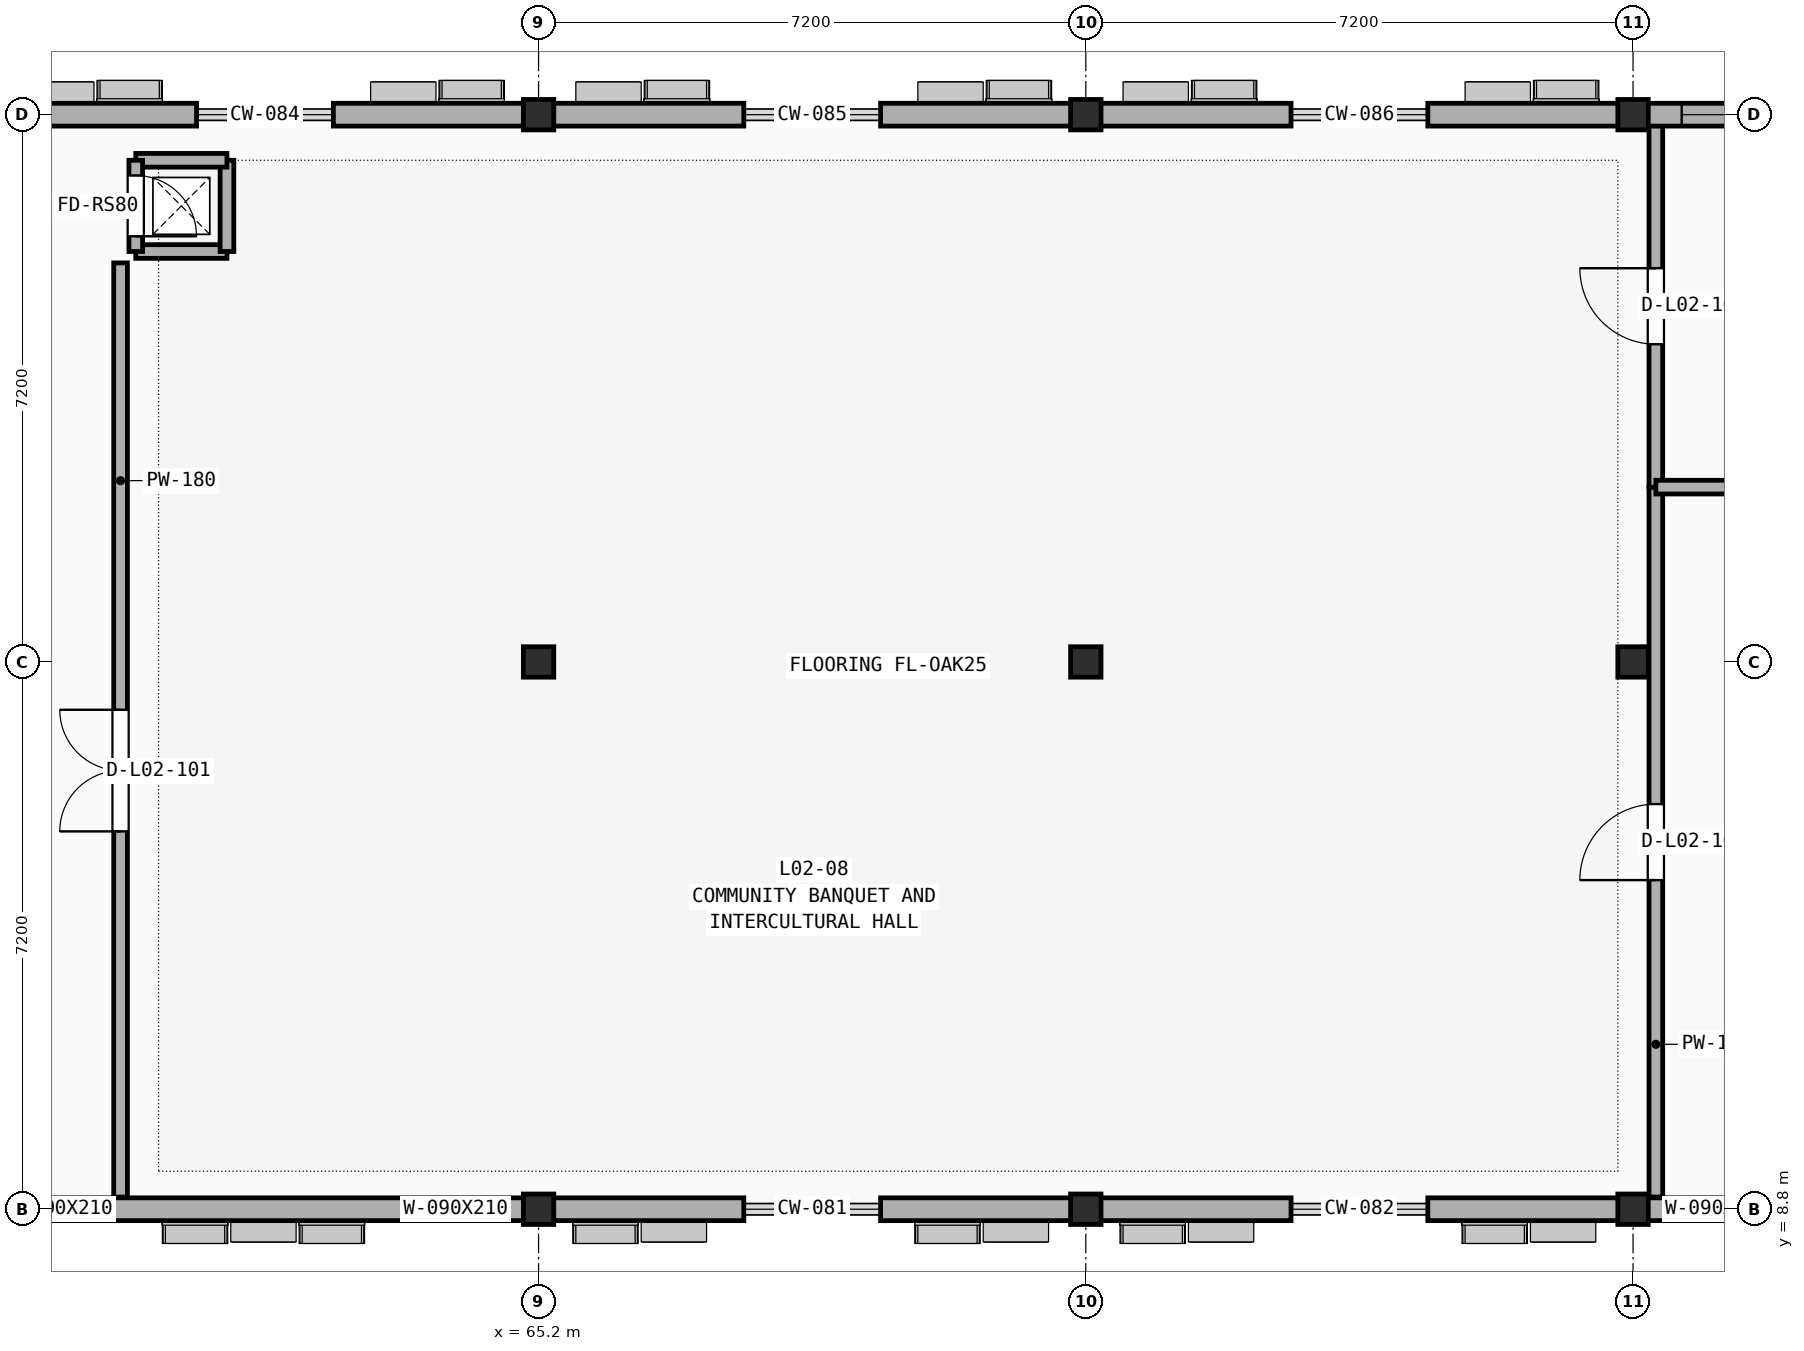
"""IFC4 building model, lengths in metres.
Left out: names, types, materials, properties, quantities, classifications, styles, units other than length and angle.
Written with IfcOpenShell. Run it as: python <this file> out.ifc"""

import sys

from ifc_helpers import new_model, si_unit, direction, frame, frame_2d, origin, origin_2d, place, context, subcontext, project, spatial, rectangle, extrude, element, fill, save


model = new_model("IFC4")
c1 = context("Model", 3, precision=1e-05, world=origin(), true_north=direction((0.0, 1.0)))
c2 = subcontext(c1, "Body", "Model", "MODEL_VIEW")
j1 = project(units=[si_unit("LENGTHUNIT", "METRE"), si_unit("PLANEANGLEUNIT", "RADIAN")], contexts=[c1])
p1 = place(None, origin())
s1 = spatial("IfcSite", under=j1, at=p1, CompositionType="ELEMENT")
p2 = place(p1, origin())
s2 = spatial("IfcBuilding", under=s1, at=p2, CompositionType="ELEMENT")
p3 = place(p2, frame((0.0, 0.0, 9.6)))
s3 = spatial("IfcBuildingStorey", under=s2, at=p3, CompositionType="ELEMENT", Elevation=9.6)
for number, where, z_axis, x_axis in (
    (1, (65.2, 8.8, 0.0), (0.0, 0.0, 1.0), (1.0, 0.0, 0.0)),
    (2, (65.2, 16.0, 0.0), (0.0, 0.0, 1.0), (1.0, 0.0, 0.0)),
    (3, (65.2, 23.2, 0.0), (0.0, 0.0, 1.0), (1.0, 0.0, 0.0)),
    (4, (72.4, 8.8, 0.0), (0.0, 0.0, 1.0), (1.0, 0.0, 0.0)),
    (5, (72.4, 16.0, 0.0), (0.0, 0.0, 1.0), (1.0, 0.0, 0.0)),
    (6, (72.4, 23.2, 0.0), (0.0, 0.0, 1.0), (1.0, 0.0, 0.0)),
    (7, (79.6, 8.8, 0.0), (0.0, 0.0, 1.0), (1.0, 0.0, 0.0)),
    (8, (79.6, 16.0, 0.0), (0.0, 0.0, 1.0), (1.0, 0.0, 0.0)),
    (9, (79.6, 23.2, 0.0), (0.0, 0.0, 1.0), (1.0, 0.0, 0.0)),
):
    element("IfcColumn", number, at=place(p3, frame(where, z_axis=z_axis, x_axis=x_axis)), inside=s3, PredefinedType="COLUMN", context=c2, shape_type="SweptSolid", body=[
        extrude(rectangle(XDim=0.4, YDim=0.4, at=origin_2d()), origin(), (0.0, 0.0, 1.0), 4.2),
    ])
p4 = place(p3, frame((59.7, 8.96, 0.0), z_axis=(0.0, 0.0, 1.0), x_axis=(0.0, 1.0, 0.0)))
e10 = element("IfcWall", 10, at=p4, inside=s3, PredefinedType="PARTITIONING", context=c2, shape_type="SweptSolid", body=[
    extrude(rectangle(XDim=12.29, YDim=0.18, at=frame_2d((6.145, 0.0))), origin(), (0.0, 0.0, 1.0), 3.37),
])
p5 = place(p4, frame((4.811, 0.0, -0.01)))
e11 = element("IfcOpeningElement", 11, at=p5, cuts=e10, PredefinedType="OPENING", context=c2, shape_type="SweptSolid", body=[
    extrude(rectangle(XDim=1.6, YDim=2.21, at=frame_2d((0.8, 1.105))), frame((0.0, 0.1, 0.0), z_axis=(0.0, -1.0, 0.0), x_axis=(1.0, 0.0, 0.0)), (0.0, 0.0, 1.0), 0.2),
])
p6 = place(p3, frame((79.9, 8.96, 0.0), z_axis=(0.0, 0.0, 1.0), x_axis=(0.0, 1.0, 0.0)))
e12 = element("IfcWall", 12, at=p6, inside=s3, PredefinedType="PARTITIONING", context=c2, shape_type="SweptSolid", body=[
    extrude(rectangle(XDim=9.34, YDim=0.18, at=frame_2d((4.67, 0.0))), origin(), (0.0, 0.0, 1.0), 3.33),
])
p7 = place(p6, frame((4.17, 0.0, -0.01)))
e13 = element("IfcOpeningElement", 13, at=p7, cuts=e12, PredefinedType="OPENING", context=c2, shape_type="SweptSolid", body=[
    extrude(rectangle(XDim=1.0, YDim=2.16, at=frame_2d((0.5, 1.08))), frame((0.0, 0.1, 0.0), z_axis=(0.0, -1.0, 0.0), x_axis=(1.0, 0.0, 0.0)), (0.0, 0.0, 1.0), 0.2),
])
p8 = place(p3, frame((79.9, 18.3, 0.0), z_axis=(0.0, 0.0, 1.0), x_axis=(0.0, 1.0, 0.0)))
e14 = element("IfcWall", 14, at=p8, inside=s3, PredefinedType="PARTITIONING", context=c2, shape_type="SweptSolid", body=[
    extrude(rectangle(XDim=4.76, YDim=0.18, at=frame_2d((2.38, 0.0))), origin(), (0.0, 0.0, 1.0), 3.33),
])
p9 = place(p8, frame((1.88, 0.0, -0.01)))
e15 = element("IfcOpeningElement", 15, at=p9, cuts=e14, PredefinedType="OPENING", context=c2, shape_type="SweptSolid", body=[
    extrude(rectangle(XDim=1.0, YDim=2.16, at=frame_2d((0.5, 1.08))), frame((0.0, 0.1, 0.0), z_axis=(0.0, -1.0, 0.0), x_axis=(1.0, 0.0, 0.0)), (0.0, 0.0, 1.0), 0.2),
])
p10 = place(p3, frame((79.9, 18.3, 0.0), z_axis=(0.0, 0.0, 1.0), x_axis=(1.0, 0.0, 0.0)))
e16 = element("IfcWall", 16, at=p10, inside=s3, PredefinedType="PARTITIONING", context=c2, shape_type="SweptSolid", body=[
    extrude(rectangle(XDim=6.76, YDim=0.18, at=frame_2d((3.38, 0.0))), origin(), (0.0, 0.0, 1.0), 3.41),
])
p11 = place(p3, frame((58.0, 8.8, 0.0), z_axis=(0.0, 0.0, 1.0), x_axis=(1.0, 0.0, 0.0)))
e17 = element("IfcWall", 17, at=p11, inside=s3, PredefinedType="SOLIDWALL", context=c2, shape_type="SweptSolid", body=[
    extrude(rectangle(XDim=7.2, YDim=0.3, at=frame_2d((3.6, 0.0))), origin(), (0.0, 0.0, 1.0), 3.33),
])
p12 = place(p11, frame((0.46, 0.0, 0.85)))
e18 = element("IfcOpeningElement", 18, at=p12, cuts=e17, PredefinedType="OPENING", context=c2, shape_type="SweptSolid", body=[
    extrude(rectangle(XDim=0.9, YDim=2.1, at=frame_2d((0.45, 1.05))), frame((0.0, 0.16, 0.0), z_axis=(0.0, -1.0, 0.0), x_axis=(1.0, 0.0, 0.0)), (0.0, 0.0, 1.0), 0.32),
])
p13 = place(p11, frame((5.66, 0.0, 0.85)))
e19 = element("IfcOpeningElement", 19, at=p13, cuts=e17, PredefinedType="OPENING", context=c2, shape_type="SweptSolid", body=[
    extrude(rectangle(XDim=0.9, YDim=2.1, at=frame_2d((0.45, 1.05))), frame((0.0, 0.16, 0.0), z_axis=(0.0, -1.0, 0.0), x_axis=(1.0, 0.0, 0.0)), (0.0, 0.0, 1.0), 0.32),
])
for number, where, z_axis, x_axis in (
    (20, (65.2, 8.8, 0.0), (0.0, 0.0, 1.0), (1.0, 0.0, 0.0)),
    (21, (69.7, 8.8, 0.0), (0.0, 0.0, 1.0), (1.0, 0.0, 0.0)),
):
    element("IfcWall", number, at=place(p3, frame(where, z_axis=z_axis, x_axis=x_axis)), inside=s3, PredefinedType="SOLIDWALL", context=c2, shape_type="SweptSolid", body=[
        extrude(rectangle(XDim=2.7, YDim=0.3, at=frame_2d((1.35, 0.0))), origin(), (0.0, 0.0, 1.0), 3.33),
    ])
for number, where, z_axis, x_axis in (
    (22, (72.4, 8.8, 0.0), (0.0, 0.0, 1.0), (1.0, 0.0, 0.0)),
    (23, (76.9, 8.8, 0.0), (0.0, 0.0, 1.0), (1.0, 0.0, 0.0)),
):
    element("IfcWall", number, at=place(p3, frame(where, z_axis=z_axis, x_axis=x_axis)), inside=s3, PredefinedType="SOLIDWALL", context=c2, shape_type="SweptSolid", body=[
        extrude(rectangle(XDim=2.7, YDim=0.3, at=frame_2d((1.35, 0.0))), origin(), (0.0, 0.0, 1.0), 3.33),
    ])
p14 = place(p3, frame((79.6, 8.8, 0.0), z_axis=(0.0, 0.0, 1.0), x_axis=(1.0, 0.0, 0.0)))
e24 = element("IfcWall", 24, at=p14, inside=s3, PredefinedType="SOLIDWALL", context=c2, shape_type="SweptSolid", body=[
    extrude(rectangle(XDim=7.2, YDim=0.3, at=frame_2d((3.6, 0.0))), origin(), (0.0, 0.0, 1.0), 3.33),
])
p15 = place(p14, frame((0.66, 0.0, 0.85)))
e25 = element("IfcOpeningElement", 25, at=p15, cuts=e24, PredefinedType="OPENING", context=c2, shape_type="SweptSolid", body=[
    extrude(rectangle(XDim=0.9, YDim=2.1, at=frame_2d((0.45, 1.05))), frame((0.0, 0.16, 0.0), z_axis=(0.0, -1.0, 0.0), x_axis=(1.0, 0.0, 0.0)), (0.0, 0.0, 1.0), 0.32),
])
p16 = place(p14, frame((5.66, 0.0, 0.85)))
e26 = element("IfcOpeningElement", 26, at=p16, cuts=e24, PredefinedType="OPENING", context=c2, shape_type="SweptSolid", body=[
    extrude(rectangle(XDim=0.9, YDim=2.1, at=frame_2d((0.45, 1.05))), frame((0.0, 0.16, 0.0), z_axis=(0.0, -1.0, 0.0), x_axis=(1.0, 0.0, 0.0)), (0.0, 0.0, 1.0), 0.32),
])
for number, where, z_axis, x_axis in (
    (27, (65.2, 23.2, 0.0), (0.0, 0.0, 1.0), (-1.0, 0.0, 0.0)),
    (28, (60.7, 23.2, 0.0), (0.0, 0.0, 1.0), (-1.0, 0.0, 0.0)),
    (29, (72.4, 23.2, 0.0), (0.0, 0.0, 1.0), (-1.0, 0.0, 0.0)),
    (30, (67.9, 23.2, 0.0), (0.0, 0.0, 1.0), (-1.0, 0.0, 0.0)),
):
    element("IfcWall", number, at=place(p3, frame(where, z_axis=z_axis, x_axis=x_axis)), inside=s3, PredefinedType="SOLIDWALL", context=c2, shape_type="SweptSolid", body=[
        extrude(rectangle(XDim=2.7, YDim=0.3, at=frame_2d((1.35, 0.0))), origin(), (0.0, 0.0, 1.0), 3.33),
    ])
for number, where, z_axis, x_axis in (
    (31, (79.6, 23.2, 0.0), (0.0, 0.0, 1.0), (-1.0, 0.0, 0.0)),
    (32, (75.1, 23.2, 0.0), (0.0, 0.0, 1.0), (-1.0, 0.0, 0.0)),
):
    element("IfcWall", number, at=place(p3, frame(where, z_axis=z_axis, x_axis=x_axis)), inside=s3, PredefinedType="SOLIDWALL", context=c2, shape_type="SweptSolid", body=[
        extrude(rectangle(XDim=2.7, YDim=0.3, at=frame_2d((1.35, 0.0))), origin(), (0.0, 0.0, 1.0), 3.33),
    ])
p17 = place(p3, frame((86.8, 23.2, 0.0), z_axis=(0.0, 0.0, 1.0), x_axis=(-1.0, 0.0, 0.0)))
e33 = element("IfcWall", 33, at=p17, inside=s3, PredefinedType="SOLIDWALL", context=c2, shape_type="SweptSolid", body=[
    extrude(rectangle(XDim=7.2, YDim=0.3, at=frame_2d((3.6, 0.0))), origin(), (0.0, 0.0, 1.0), 3.33),
])
p18 = place(p17, frame((0.46, 0.0, 0.85)))
e34 = element("IfcOpeningElement", 34, at=p18, cuts=e33, PredefinedType="OPENING", context=c2, shape_type="SweptSolid", body=[
    extrude(rectangle(XDim=0.9, YDim=2.1, at=frame_2d((0.45, 1.05))), frame((0.0, 0.16, 0.0), z_axis=(0.0, -1.0, 0.0), x_axis=(1.0, 0.0, 0.0)), (0.0, 0.0, 1.0), 0.32),
])
p19 = place(p17, frame((5.66, 0.0, 0.85)))
e35 = element("IfcOpeningElement", 35, at=p19, cuts=e33, PredefinedType="OPENING", context=c2, shape_type="SweptSolid", body=[
    extrude(rectangle(XDim=0.9, YDim=2.1, at=frame_2d((0.45, 1.05))), frame((0.0, 0.16, 0.0), z_axis=(0.0, -1.0, 0.0), x_axis=(1.0, 0.0, 0.0)), (0.0, 0.0, 1.0), 0.32),
])
for number, where, z_axis, x_axis in (
    (36, (59.9, 21.4, 0.0), (0.0, 0.0, 1.0), (1.0, 0.0, 0.0)),
    (37, (61.1, 21.4, 0.0), (0.0, 0.0, 1.0), (0.0, 1.0, 0.0)),
    (38, (61.1, 22.6, 0.0), (0.0, 0.0, 1.0), (-1.0, 0.0, 0.0)),
):
    element("IfcWall", number, at=place(p3, frame(where, z_axis=z_axis, x_axis=x_axis)), inside=s3, PredefinedType="SOLIDWALL", context=c2, shape_type="SweptSolid", body=[
        extrude(rectangle(XDim=1.2, YDim=0.18, at=frame_2d((0.6, 0.0))), origin(), (0.0, 0.0, 1.0), 3.97),
    ])
p20 = place(p3, frame((59.9, 22.6, 0.0), z_axis=(0.0, 0.0, 1.0), x_axis=(0.0, -1.0, 0.0)))
e39 = element("IfcWall", 39, at=p20, inside=s3, PredefinedType="SOLIDWALL", context=c2, shape_type="SweptSolid", body=[
    extrude(rectangle(XDim=1.2, YDim=0.18, at=frame_2d((0.6, 0.0))), origin(), (0.0, 0.0, 1.0), 3.97),
])
p21 = place(p20, frame((0.2, 0.0, -0.01)))
e40 = element("IfcOpeningElement", 40, at=p21, cuts=e39, PredefinedType="OPENING", context=c2, shape_type="SweptSolid", body=[
    extrude(rectangle(XDim=0.8, YDim=2.06, at=frame_2d((0.4, 1.03))), frame((0.0, 0.1, 0.0), z_axis=(0.0, -1.0, 0.0), x_axis=(1.0, 0.0, 0.0)), (0.0, 0.0, 1.0), 0.2),
])
p22 = place(p5, frame((0.0, 0.0, 0.01)))
e41 = element("IfcDoor", 41, at=p22, inside=s3, OperationType="DOUBLE_SWING_LEFT", PredefinedType="DOOR", context=c2, shape_type="SweptSolid", body=[
    extrude(rectangle(XDim=1.6, YDim=2.2, at=frame_2d((0.8, 1.1))), frame((0.0, 0.025, 0.0), z_axis=(0.0, -1.0, 0.0), x_axis=(1.0, 0.0, 0.0)), (0.0, 0.0, 1.0), 0.05),
])
fill(e11, e41)
p23 = place(p7, frame((1.0, 0.0, 0.01), z_axis=(0.0, 0.0, 1.0), x_axis=(-1.0, 0.0, 0.0)))
e42 = element("IfcDoor", 42, at=p23, inside=s3, OperationType="SINGLE_SWING_LEFT", PredefinedType="DOOR", context=c2, shape_type="SweptSolid", body=[
    extrude(rectangle(XDim=1.0, YDim=2.15, at=frame_2d((0.5, 1.075))), frame((0.0, 0.025, 0.0), z_axis=(0.0, -1.0, 0.0), x_axis=(1.0, 0.0, 0.0)), (0.0, 0.0, 1.0), 0.05),
])
fill(e13, e42)
p24 = place(p9, frame((0.0, 0.0, 0.01)))
e43 = element("IfcDoor", 43, at=p24, inside=s3, OperationType="SINGLE_SWING_RIGHT", PredefinedType="DOOR", context=c2, shape_type="SweptSolid", body=[
    extrude(rectangle(XDim=1.0, YDim=2.15, at=frame_2d((0.5, 1.075))), frame((0.0, 0.025, 0.0), z_axis=(0.0, -1.0, 0.0), x_axis=(1.0, 0.0, 0.0)), (0.0, 0.0, 1.0), 0.05),
])
fill(e15, e43)
p25 = place(p12, origin())
e44 = element("IfcWindow", 44, at=p25, inside=s3, PartitioningType="SINGLE_PANEL", PredefinedType="WINDOW", context=c2, shape_type="SweptSolid", body=[
    extrude(rectangle(XDim=0.9, YDim=2.1, at=frame_2d((0.45, 1.05))), frame((0.0, 0.03, 0.0), z_axis=(0.0, -1.0, 0.0), x_axis=(1.0, 0.0, 0.0)), (0.0, 0.0, 1.0), 0.06),
])
fill(e18, e44)
p26 = place(p13, origin())
e45 = element("IfcWindow", 45, at=p26, inside=s3, PartitioningType="SINGLE_PANEL", PredefinedType="WINDOW", context=c2, shape_type="SweptSolid", body=[
    extrude(rectangle(XDim=0.9, YDim=2.1, at=frame_2d((0.45, 1.05))), frame((0.0, 0.03, 0.0), z_axis=(0.0, -1.0, 0.0), x_axis=(1.0, 0.0, 0.0)), (0.0, 0.0, 1.0), 0.06),
])
fill(e19, e45)
p27 = place(p15, origin())
e46 = element("IfcWindow", 46, at=p27, inside=s3, PartitioningType="SINGLE_PANEL", PredefinedType="WINDOW", context=c2, shape_type="SweptSolid", body=[
    extrude(rectangle(XDim=0.9, YDim=2.1, at=frame_2d((0.45, 1.05))), frame((0.0, 0.03, 0.0), z_axis=(0.0, -1.0, 0.0), x_axis=(1.0, 0.0, 0.0)), (0.0, 0.0, 1.0), 0.06),
])
fill(e25, e46)
p28 = place(p19, origin())
e47 = element("IfcWindow", 47, at=p28, inside=s3, PartitioningType="SINGLE_PANEL", PredefinedType="WINDOW", context=c2, shape_type="SweptSolid", body=[
    extrude(rectangle(XDim=0.9, YDim=2.1, at=frame_2d((0.45, 1.05))), frame((0.0, 0.03, 0.0), z_axis=(0.0, -1.0, 0.0), x_axis=(1.0, 0.0, 0.0)), (0.0, 0.0, 1.0), 0.06),
])
fill(e35, e47)
p29 = place(p21, frame((0.0, 0.0, 0.01)))
e48 = element("IfcDoor", 48, at=p29, inside=s3, OperationType="SINGLE_SWING_RIGHT", PredefinedType="DOOR", context=c2, shape_type="SweptSolid", body=[
    extrude(rectangle(XDim=0.8, YDim=2.05, at=frame_2d((0.4, 1.025))), frame((0.0, 0.025, 0.0), z_axis=(0.0, -1.0, 0.0), x_axis=(1.0, 0.0, 0.0)), (0.0, 0.0, 1.0), 0.05),
])
fill(e40, e48)
save(model, sys.argv[1])
